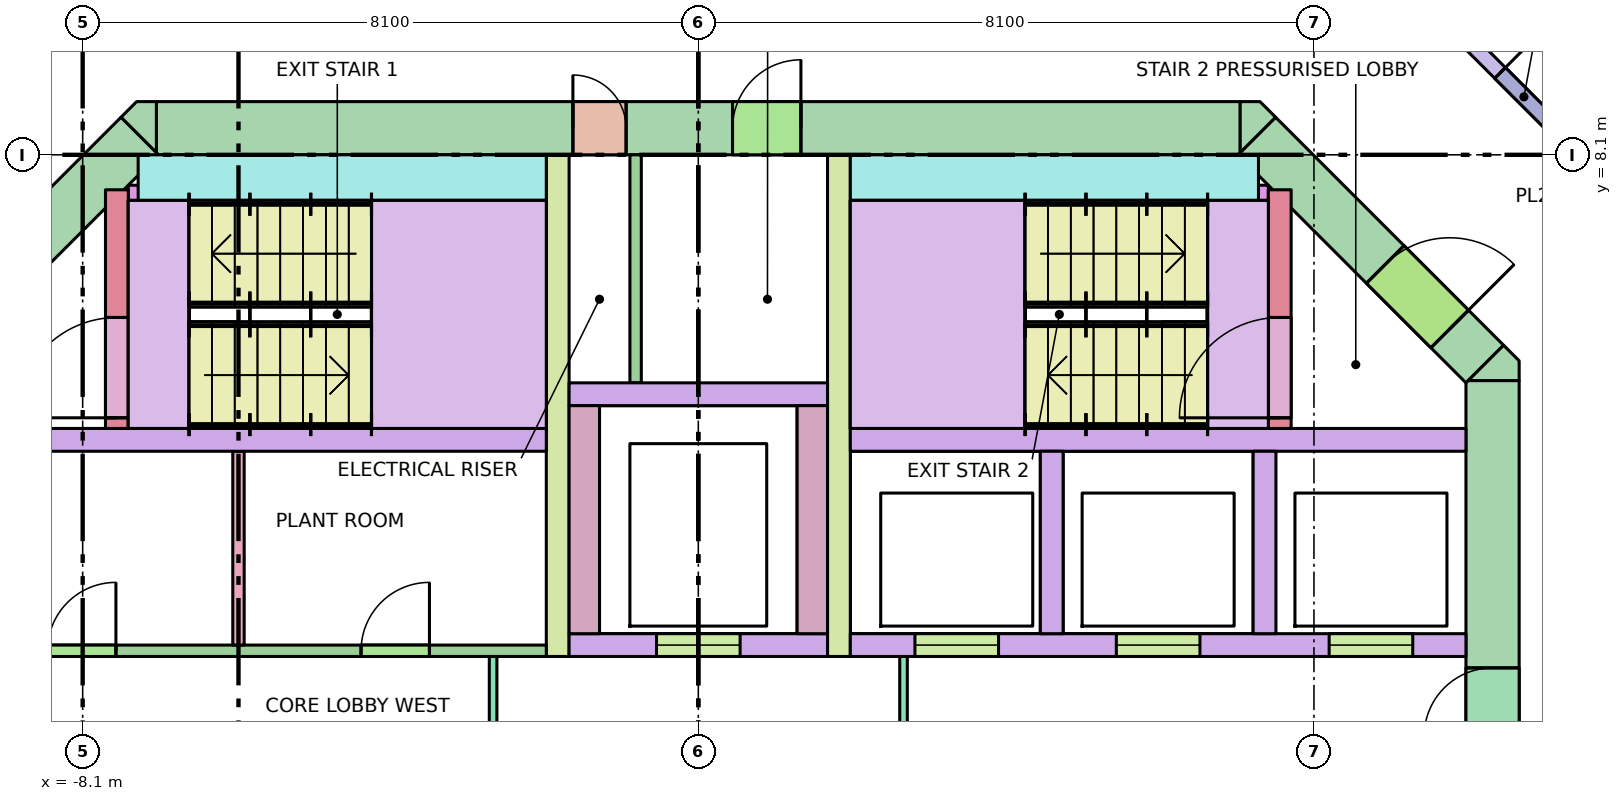
"""IFC4 building model, lengths in metres.
Left out: names, types, materials, properties, quantities, classifications, styles, units other than length and angle.
Written with IfcOpenShell. Run it as: python <this file> out.ifc"""

import sys

from ifc_helpers import new_model, si_unit, direction, frame, frame_2d, origin, place, context, subcontext, project, spatial, polyline, rectangle, outline, extrude, element, fill, save


model = new_model("IFC4")
c1 = context("Model", 3, precision=1e-05, world=origin(), true_north=direction((0.0, 1.0)))
c2 = subcontext(c1, "Body", "Model", "MODEL_VIEW")
j1 = project(units=[si_unit("LENGTHUNIT", "METRE"), si_unit("PLANEANGLEUNIT", "RADIAN")], contexts=[c1])
p1 = place(None, origin())
s1 = spatial("IfcSite", under=j1, at=p1, CompositionType="ELEMENT")
p2 = place(p1, origin())
s2 = spatial("IfcBuilding", under=s1, at=p2, CompositionType="ELEMENT")
p3 = place(p2, frame((0.0, 0.0, 183.8)))
s3 = spatial("IfcBuildingStorey", under=s2, at=p3, CompositionType="ELEMENT", Elevation=183.8)
p4 = place(p3, frame((-7.13, 8.45, -0.28), z_axis=(0.0, 0.0, 1.0), x_axis=(1.0, 0.0, 0.0)))
e1 = element("IfcWall", 1, at=p4, inside=s3, PredefinedType="SHEAR", context=c2, shape_type="SweptSolid", body=[
    extrude(rectangle(XDim=14.26, YDim=0.7, at=frame_2d((7.13, 0.0))), origin(), (0.0, 0.0, 1.0), 9.0),
])
p5 = place(p4, frame((5.48, 0.0, 0.28)))
e2 = element("IfcOpeningElement", 2, at=p5, cuts=e1, PredefinedType="OPENING", context=c2, shape_type="SweptSolid", body=[
    extrude(rectangle(XDim=0.7, YDim=2.1, at=frame_2d((0.35, 1.05))), frame((0.0, 0.36, 0.0), z_axis=(0.0, -1.0, 0.0), x_axis=(1.0, 0.0, 0.0)), (0.0, 0.0, 1.0), 0.72),
])
p6 = place(p4, frame((7.58, 0.0, 0.28)))
e3 = element("IfcOpeningElement", 3, at=p6, cuts=e1, PredefinedType="OPENING", context=c2, shape_type="SweptSolid", body=[
    extrude(rectangle(XDim=0.9, YDim=2.1, at=frame_2d((0.45, 1.05))), frame((0.0, 0.36, 0.0), z_axis=(0.0, -1.0, 0.0), x_axis=(1.0, 0.0, 0.0)), (0.0, 0.0, 1.0), 0.72),
])
p7 = place(p3, frame((10.45, -5.13, -0.28), z_axis=(0.0, 0.0, 1.0), x_axis=(0.0, 1.0, 0.0)))
e4 = element("IfcWall", 4, at=p7, inside=s3, PredefinedType="SHEAR", context=c2, shape_type="SweptSolid", body=[
    extrude(rectangle(XDim=10.26, YDim=0.7, at=frame_2d((5.13, 0.0))), origin(), (0.0, 0.0, 1.0), 9.0),
])
p8 = place(p7, frame((5.58, 0.0, 0.28)))
e5 = element("IfcOpeningElement", 5, at=p8, cuts=e4, PredefinedType="OPENING", context=c2, shape_type="SweptSolid", body=[
    extrude(rectangle(XDim=0.9, YDim=2.1, at=frame_2d((0.45, 1.05))), frame((0.0, 0.36, 0.0), z_axis=(0.0, -1.0, 0.0), x_axis=(1.0, 0.0, 0.0)), (0.0, 0.0, 1.0), 0.72),
])
p9 = place(p7, frame((3.78, 0.0, 0.28)))
e6 = element("IfcOpeningElement", 6, at=p9, cuts=e4, PredefinedType="OPENING", context=c2, shape_type="SweptSolid", body=[
    extrude(rectangle(XDim=0.9, YDim=2.1, at=frame_2d((0.45, 1.05))), frame((0.0, 0.36, 0.0), z_axis=(0.0, -1.0, 0.0), x_axis=(1.0, 0.0, 0.0)), (0.0, 0.0, 1.0), 0.72),
])
p10 = place(p3, frame((-10.347, 5.347, -0.28), z_axis=(0.0, 0.0, 1.0), x_axis=(0.707106781187, 0.707106781187, 0.0)))
e7 = element("IfcWall", 7, at=p10, inside=s3, PredefinedType="SHEAR", context=c2, shape_type="SweptSolid", body=[
    extrude(rectangle(XDim=4.243, YDim=0.7, at=frame_2d((2.121, 0.0))), origin(), (0.0, 0.0, 1.0), 9.0),
])
p11 = place(p10, frame((0.65, 0.0, 0.28)))
e8 = element("IfcOpeningElement", 8, at=p11, cuts=e7, PredefinedType="OPENING", context=c2, shape_type="SweptSolid", body=[
    extrude(rectangle(XDim=1.2, YDim=2.1, at=frame_2d((0.6, 1.05))), frame((0.0, 0.36, 0.0), z_axis=(0.0, -1.0, 0.0), x_axis=(1.0, 0.0, 0.0)), (0.0, 0.0, 1.0), 0.72),
])
p12 = place(p3, frame((7.347, 8.347, -0.28), z_axis=(0.0, 0.0, 1.0), x_axis=(0.707106781187, -0.707106781187, 0.0)))
e9 = element("IfcWall", 9, at=p12, inside=s3, PredefinedType="SHEAR", context=c2, shape_type="SweptSolid", body=[
    extrude(rectangle(XDim=4.243, YDim=0.7, at=frame_2d((2.121, 0.0))), origin(), (0.0, 0.0, 1.0), 9.0),
])
p13 = place(p12, frame((2.39, 0.0, 0.28)))
e10 = element("IfcOpeningElement", 10, at=p13, cuts=e9, PredefinedType="OPENING", context=c2, shape_type="SweptSolid", body=[
    extrude(rectangle(XDim=1.2, YDim=2.1, at=frame_2d((0.6, 1.05))), frame((0.0, 0.36, 0.0), z_axis=(0.0, -1.0, 0.0), x_axis=(1.0, 0.0, 0.0)), (0.0, 0.0, 1.0), 0.72),
])
p14 = place(p3, frame((0.0, 0.0, -0.28)))
e11 = element("IfcWall", 11, at=p14, inside=s3, PredefinedType="SHEAR", context=c2, shape_type="SweptSolid", body=[
    extrude(outline(polyline([(10.8, 5.39), (10.8, 5.13), (10.8, 5.13), (10.13, 5.13), (10.595, 5.595), (10.595, 5.595), (10.595, 5.595), (10.8, 5.39)])), origin(), (0.0, 0.0, 1.0), 9.0),
])
p15 = place(p3, frame((0.0, 0.0, -0.28)))
e12 = element("IfcWall", 12, at=p15, inside=s3, PredefinedType="SHEAR", context=c2, shape_type="SweptSolid", body=[
    extrude(outline(polyline([(-7.39, 8.8), (-7.13, 8.8), (-7.13, 8.8), (-7.13, 8.13), (-7.595, 8.595), (-7.595, 8.595), (-7.595, 8.595), (-7.39, 8.8)])), origin(), (0.0, 0.0, 1.0), 9.0),
])
p16 = place(p3, frame((0.0, 0.0, -0.28)))
e13 = element("IfcWall", 13, at=p16, inside=s3, PredefinedType="SHEAR", context=c2, shape_type="SweptSolid", body=[
    extrude(outline(polyline([(7.39, 8.8), (7.595, 8.595), (7.595, 8.595), (7.595, 8.595), (7.13, 8.13), (7.13, 8.8), (7.13, 8.8), (7.39, 8.8)])), origin(), (0.0, 0.0, 1.0), 9.0),
])
for number, where, z_axis, x_axis in (
    (14, (-10.1, 4.35, 0.0), (0.0, 0.0, 1.0), (1.0, 0.0, 0.0)),
    (15, (2.0, 4.35, 0.0), (0.0, 0.0, 1.0), (1.0, 0.0, 0.0)),
):
    element("IfcWall", number, at=place(p3, frame(where, z_axis=z_axis, x_axis=x_axis)), inside=s3, PredefinedType="SOLIDWALL", context=c2, shape_type="SweptSolid", body=[
        extrude(rectangle(XDim=8.1, YDim=0.3, at=frame_2d((4.05, 0.0))), origin(), (0.0, 0.0, 1.0), 8.72),
    ])
p17 = place(p3, frame((2.0, 1.65, 0.0), z_axis=(0.0, 0.0, 1.0), x_axis=(1.0, 0.0, 0.0)))
e16 = element("IfcWall", 16, at=p17, inside=s3, PredefinedType="SOLIDWALL", context=c2, shape_type="SweptSolid", body=[
    extrude(rectangle(XDim=8.1, YDim=0.3, at=frame_2d((4.05, 0.0))), origin(), (0.0, 0.0, 1.0), 8.72),
])
p18 = place(p17, frame((0.85, 0.0, 0.0)))
e17 = element("IfcOpeningElement", 17, at=p18, cuts=e16, PredefinedType="OPENING", context=c2, shape_type="SweptSolid", body=[
    extrude(rectangle(XDim=1.1, YDim=2.1, at=frame_2d((0.55, 1.05))), frame((0.0, 0.16, 0.0), z_axis=(0.0, -1.0, 0.0), x_axis=(1.0, 0.0, 0.0)), (0.0, 0.0, 1.0), 0.32),
])
p19 = place(p17, frame((3.5, 0.0, 0.0)))
e18 = element("IfcOpeningElement", 18, at=p19, cuts=e16, PredefinedType="OPENING", context=c2, shape_type="SweptSolid", body=[
    extrude(rectangle(XDim=1.1, YDim=2.1, at=frame_2d((0.55, 1.05))), frame((0.0, 0.16, 0.0), z_axis=(0.0, -1.0, 0.0), x_axis=(1.0, 0.0, 0.0)), (0.0, 0.0, 1.0), 0.32),
])
p20 = place(p17, frame((6.3, 0.0, 0.0)))
e19 = element("IfcOpeningElement", 19, at=p20, cuts=e16, PredefinedType="OPENING", context=c2, shape_type="SweptSolid", body=[
    extrude(rectangle(XDim=1.1, YDim=2.1, at=frame_2d((0.55, 1.05))), frame((0.0, 0.16, 0.0), z_axis=(0.0, -1.0, 0.0), x_axis=(1.0, 0.0, 0.0)), (0.0, 0.0, 1.0), 0.32),
])
for number, where, z_axis, x_axis in (
    (20, (4.65, 1.8, 0.0), (0.0, 0.0, 1.0), (0.0, 1.0, 0.0)),
    (21, (7.45, 1.8, 0.0), (0.0, 0.0, 1.0), (0.0, 1.0, 0.0)),
):
    element("IfcWall", number, at=place(p3, frame(where, z_axis=z_axis, x_axis=x_axis)), inside=s3, PredefinedType="SOLIDWALL", context=c2, shape_type="SweptSolid", body=[
        extrude(rectangle(XDim=2.4, YDim=0.3, at=frame_2d((1.2, 0.0))), origin(), (0.0, 0.0, 1.0), 8.72),
    ])
for number, where, z_axis, x_axis in (
    (22, (-1.85, 1.5, 0.0), (0.0, 0.0, 1.0), (0.0, 1.0, 0.0)),
    (23, (1.85, 1.5, 0.0), (0.0, 0.0, 1.0), (0.0, 1.0, 0.0)),
):
    element("IfcWall", number, at=place(p3, frame(where, z_axis=z_axis, x_axis=x_axis)), inside=s3, PredefinedType="SHEAR", context=c2, shape_type="SweptSolid", body=[
        extrude(rectangle(XDim=6.6, YDim=0.3, at=frame_2d((3.3, 0.0))), origin(), (0.0, 0.0, 1.0), 8.72),
    ])
p21 = place(p3, frame((-1.7, 1.65, 0.0), z_axis=(0.0, 0.0, 1.0), x_axis=(1.0, 0.0, 0.0)))
e24 = element("IfcWall", 24, at=p21, inside=s3, PredefinedType="SOLIDWALL", context=c2, shape_type="SweptSolid", body=[
    extrude(rectangle(XDim=3.4, YDim=0.3, at=frame_2d((1.7, 0.0))), origin(), (0.0, 0.0, 1.0), 8.72),
])
p22 = place(p21, frame((1.15, 0.0, 0.0)))
e25 = element("IfcOpeningElement", 25, at=p22, cuts=e24, PredefinedType="OPENING", context=c2, shape_type="SweptSolid", body=[
    extrude(rectangle(XDim=1.1, YDim=2.1, at=frame_2d((0.55, 1.05))), frame((0.0, 0.16, 0.0), z_axis=(0.0, -1.0, 0.0), x_axis=(1.0, 0.0, 0.0)), (0.0, 0.0, 1.0), 0.32),
])
for number, where, z_axis, x_axis in (
    (26, (-1.5, 1.8, 0.0), (0.0, 0.0, 1.0), (0.0, 1.0, 0.0)),
    (27, (1.5, 1.8, 0.0), (0.0, 0.0, 1.0), (0.0, 1.0, 0.0)),
):
    element("IfcWall", number, at=place(p3, frame(where, z_axis=z_axis, x_axis=x_axis)), inside=s3, PredefinedType="SOLIDWALL", context=c2, shape_type="SweptSolid", body=[
        extrude(rectangle(XDim=3.0, YDim=0.4, at=frame_2d((1.5, 0.0))), origin(), (0.0, 0.0, 1.0), 8.72),
    ])
p23 = place(p3, frame((-1.7, 4.95, 0.0), z_axis=(0.0, 0.0, 1.0), x_axis=(1.0, 0.0, 0.0)))
e28 = element("IfcWall", 28, at=p23, inside=s3, PredefinedType="SOLIDWALL", context=c2, shape_type="SweptSolid", body=[
    extrude(rectangle(XDim=3.4, YDim=0.3, at=frame_2d((1.7, 0.0))), origin(), (0.0, 0.0, 1.0), 8.72),
])
p24 = place(p3, frame((-7.65, 4.5, 0.0), z_axis=(0.0, 0.0, 1.0), x_axis=(0.0, 1.0, 0.0)))
e29 = element("IfcWall", 29, at=p24, inside=s3, PredefinedType="SHEAR", context=c2, shape_type="SweptSolid", body=[
    extrude(rectangle(XDim=3.14, YDim=0.3, at=frame_2d((1.57, 0.0))), origin(), (0.0, 0.0, 1.0), 8.72),
])
p25 = place(p24, frame((0.14, 0.0, 0.0)))
e30 = element("IfcOpeningElement", 30, at=p25, cuts=e29, PredefinedType="OPENING", context=c2, shape_type="SweptSolid", body=[
    extrude(rectangle(XDim=1.32, YDim=2.1, at=frame_2d((0.66, 1.05))), frame((0.0, 0.16, 0.0), z_axis=(0.0, -1.0, 0.0), x_axis=(1.0, 0.0, 0.0)), (0.0, 0.0, 1.0), 0.32),
])
p26 = place(p3, frame((-7.37, 7.8, 0.0), z_axis=(0.0, 0.0, 1.0), x_axis=(1.0, 0.0, 0.0)))
e31 = element("IfcWall", 31, at=p26, inside=s3, PredefinedType="SHEAR", context=c2, shape_type="SweptSolid", body=[
    extrude(rectangle(XDim=5.37, YDim=0.6, at=frame_2d((2.685, 0.0))), origin(), (0.0, 0.0, 1.0), 8.72),
])
p27 = place(p3, frame((7.65, 4.5, 0.0), z_axis=(0.0, 0.0, 1.0), x_axis=(0.0, 1.0, 0.0)))
e32 = element("IfcWall", 32, at=p27, inside=s3, PredefinedType="SHEAR", context=c2, shape_type="SweptSolid", body=[
    extrude(rectangle(XDim=3.14, YDim=0.3, at=frame_2d((1.57, 0.0))), origin(), (0.0, 0.0, 1.0), 8.72),
])
p28 = place(p27, frame((0.14, 0.0, 0.0)))
e33 = element("IfcOpeningElement", 33, at=p28, cuts=e32, PredefinedType="OPENING", context=c2, shape_type="SweptSolid", body=[
    extrude(rectangle(XDim=1.32, YDim=2.1, at=frame_2d((0.66, 1.05))), frame((0.0, 0.16, 0.0), z_axis=(0.0, -1.0, 0.0), x_axis=(1.0, 0.0, 0.0)), (0.0, 0.0, 1.0), 0.32),
])
p29 = place(p3, frame((2.0, 7.8, 0.0), z_axis=(0.0, 0.0, 1.0), x_axis=(1.0, 0.0, 0.0)))
e34 = element("IfcWall", 34, at=p29, inside=s3, PredefinedType="SHEAR", context=c2, shape_type="SweptSolid", body=[
    extrude(rectangle(XDim=5.37, YDim=0.6, at=frame_2d((2.685, 0.0))), origin(), (0.0, 0.0, 1.0), 8.72),
])
for number, where, z_axis, x_axis in (
    (35, (-7.5, 7.6, 0.0), (0.0, 0.0, 1.0), (1.0, 0.0, 0.0)),
    (36, (6.9, 7.6, 0.0), (0.0, 0.0, 1.0), (1.0, 0.0, 0.0)),
):
    element("IfcWall", number, at=place(p3, frame(where, z_axis=z_axis, x_axis=x_axis)), inside=s3, PredefinedType="SHEAR", context=c2, shape_type="SweptSolid", body=[
        extrude(rectangle(XDim=0.6, YDim=0.2, at=frame_2d((0.3, 0.0))), origin(), (0.0, 0.0, 1.0), 8.72),
    ])
p30 = place(p3, frame((-2.7, -1.5, 0.0), z_axis=(0.0, 0.0, 1.0), x_axis=(0.0, 1.0, 0.0)))
e37 = element("IfcWall", 37, at=p30, inside=s3, PredefinedType="PARTITIONING", context=c2, shape_type="SweptSolid", body=[
    extrude(rectangle(XDim=3.0, YDim=0.1, at=frame_2d((1.5, 0.0))), origin(), (0.0, 0.0, 1.0), 8.72),
])
p31 = place(p30, frame((0.9, 0.0, 0.0)))
e38 = element("IfcOpeningElement", 38, at=p31, cuts=e37, PredefinedType="OPENING", context=c2, shape_type="SweptSolid", body=[
    extrude(rectangle(XDim=1.2, YDim=2.1, at=frame_2d((0.6, 1.05))), frame((0.0, 0.06, 0.0), z_axis=(0.0, -1.0, 0.0), x_axis=(1.0, 0.0, 0.0)), (0.0, 0.0, 1.0), 0.12),
])
p32 = place(p3, frame((2.7, -1.5, 0.0), z_axis=(0.0, 0.0, 1.0), x_axis=(0.0, 1.0, 0.0)))
e39 = element("IfcWall", 39, at=p32, inside=s3, PredefinedType="PARTITIONING", context=c2, shape_type="SweptSolid", body=[
    extrude(rectangle(XDim=3.0, YDim=0.1, at=frame_2d((1.5, 0.0))), origin(), (0.0, 0.0, 1.0), 8.72),
])
p33 = place(p32, frame((0.9, 0.0, 0.0)))
e40 = element("IfcOpeningElement", 40, at=p33, cuts=e39, PredefinedType="OPENING", context=c2, shape_type="SweptSolid", body=[
    extrude(rectangle(XDim=1.2, YDim=2.1, at=frame_2d((0.6, 1.05))), frame((0.0, 0.06, 0.0), z_axis=(0.0, -1.0, 0.0), x_axis=(1.0, 0.0, 0.0)), (0.0, 0.0, 1.0), 0.12),
])
p34 = place(p3, frame((-0.825, 5.1, 0.0), z_axis=(0.0, 0.0, 1.0), x_axis=(0.0, 1.0, 0.0)))
e41 = element("IfcWall", 41, at=p34, inside=s3, PredefinedType="PARTITIONING", context=c2, shape_type="SweptSolid", body=[
    extrude(rectangle(XDim=3.0, YDim=0.15, at=frame_2d((1.5, 0.0))), origin(), (0.0, 0.0, 1.0), 8.72),
])
p35 = place(p3, frame((-6.05, 1.65, 0.0), z_axis=(0.0, 0.0, 1.0), x_axis=(0.0, 1.0, 0.0)))
e42 = element("IfcWall", 42, at=p35, inside=s3, PredefinedType="PARTITIONING", context=c2, shape_type="SweptSolid", body=[
    extrude(rectangle(XDim=2.55, YDim=0.15, at=frame_2d((1.275, 0.0))), origin(), (0.0, 0.0, 1.0), 8.72),
])
p36 = place(p3, frame((-10.1, 1.575, 0.0), z_axis=(0.0, 0.0, 1.0), x_axis=(1.0, 0.0, 0.0)))
e43 = element("IfcWall", 43, at=p36, inside=s3, PredefinedType="PARTITIONING", context=c2, shape_type="SweptSolid", body=[
    extrude(rectangle(XDim=8.1, YDim=0.15, at=frame_2d((4.05, 0.0))), origin(), (0.0, 0.0, 1.0), 8.72),
])
p37 = place(p36, frame((1.538, 0.0, 0.0)))
e44 = element("IfcOpeningElement", 44, at=p37, cuts=e43, PredefinedType="OPENING", context=c2, shape_type="SweptSolid", body=[
    extrude(rectangle(XDim=0.9, YDim=2.1, at=frame_2d((0.45, 1.05))), frame((0.0, 0.085, 0.0), z_axis=(0.0, -1.0, 0.0), x_axis=(1.0, 0.0, 0.0)), (0.0, 0.0, 1.0), 0.17),
])
p38 = place(p36, frame((5.663, 0.0, 0.0)))
e45 = element("IfcOpeningElement", 45, at=p38, cuts=e43, PredefinedType="OPENING", context=c2, shape_type="SweptSolid", body=[
    extrude(rectangle(XDim=0.9, YDim=2.1, at=frame_2d((0.45, 1.05))), frame((0.0, 0.085, 0.0), z_axis=(0.0, -1.0, 0.0), x_axis=(1.0, 0.0, 0.0)), (0.0, 0.0, 1.0), 0.17),
])
p39 = place(p3, frame((-13.25, 6.475, 0.0), z_axis=(0.0, 0.0, 1.0), x_axis=(0.707106781187, 0.707106781187, 0.0)))
e46 = element("IfcWall", 46, at=p39, inside=s3, PredefinedType="PARTITIONING", context=c2, shape_type="SweptSolid", body=[
    extrude(rectangle(XDim=6.753, YDim=0.2, at=frame_2d((3.377, 0.0))), origin(), (0.0, 0.0, 1.0), 7.92),
])
p40 = place(p39, frame((5.447, 0.0, 0.0)))
e47 = element("IfcOpeningElement", 47, at=p40, cuts=e46, PredefinedType="OPENING", context=c2, shape_type="SweptSolid", body=[
    extrude(rectangle(XDim=0.9, YDim=2.1, at=frame_2d((0.45, 1.05))), frame((0.0, 0.11, 0.0), z_axis=(0.0, -1.0, 0.0), x_axis=(1.0, 0.0, 0.0)), (0.0, 0.0, 1.0), 0.22),
])
p41 = place(p39, frame((2.021, 0.0, 0.0)))
e48 = element("IfcOpeningElement", 48, at=p41, cuts=e46, PredefinedType="OPENING", context=c2, shape_type="SweptSolid", body=[
    extrude(rectangle(XDim=1.8, YDim=2.1, at=frame_2d((0.9, 1.05))), frame((0.0, 0.11, 0.0), z_axis=(0.0, -1.0, 0.0), x_axis=(1.0, 0.0, 0.0)), (0.0, 0.0, 1.0), 0.22),
])
p42 = place(p3, frame((8.475, 11.25, 0.0), z_axis=(0.0, 0.0, 1.0), x_axis=(0.707106781187, -0.707106781187, 0.0)))
e49 = element("IfcWall", 49, at=p42, inside=s3, PredefinedType="PARTITIONING", context=c2, shape_type="SweptSolid", body=[
    extrude(rectangle(XDim=6.753, YDim=0.2, at=frame_2d((3.377, 0.0))), origin(), (0.0, 0.0, 1.0), 7.92),
])
p43 = place(p42, frame((2.932, 0.0, 0.0)))
e50 = element("IfcOpeningElement", 50, at=p43, cuts=e49, PredefinedType="OPENING", context=c2, shape_type="SweptSolid", body=[
    extrude(rectangle(XDim=1.8, YDim=2.1, at=frame_2d((0.9, 1.05))), frame((0.0, 0.11, 0.0), z_axis=(0.0, -1.0, 0.0), x_axis=(1.0, 0.0, 0.0)), (0.0, 0.0, 1.0), 0.22),
])
p44 = place(p18, origin())
e51 = element("IfcDoor", 51, at=p44, inside=s3, OperationType="DOUBLE_DOOR_SLIDING", PredefinedType="DOOR", context=c2, shape_type="SweptSolid", body=[
    extrude(rectangle(XDim=1.1, YDim=2.1, at=frame_2d((0.55, 1.05))), frame((0.0, 0.025, 0.0), z_axis=(0.0, -1.0, 0.0), x_axis=(1.0, 0.0, 0.0)), (0.0, 0.0, 1.0), 0.05),
])
fill(e17, e51)
p45 = place(p19, origin())
e52 = element("IfcDoor", 52, at=p45, inside=s3, OperationType="DOUBLE_DOOR_SLIDING", PredefinedType="DOOR", context=c2, shape_type="SweptSolid", body=[
    extrude(rectangle(XDim=1.1, YDim=2.1, at=frame_2d((0.55, 1.05))), frame((0.0, 0.025, 0.0), z_axis=(0.0, -1.0, 0.0), x_axis=(1.0, 0.0, 0.0)), (0.0, 0.0, 1.0), 0.05),
])
fill(e18, e52)
p46 = place(p20, origin())
e53 = element("IfcDoor", 53, at=p46, inside=s3, OperationType="DOUBLE_DOOR_SLIDING", PredefinedType="DOOR", context=c2, shape_type="SweptSolid", body=[
    extrude(rectangle(XDim=1.1, YDim=2.1, at=frame_2d((0.55, 1.05))), frame((0.0, 0.025, 0.0), z_axis=(0.0, -1.0, 0.0), x_axis=(1.0, 0.0, 0.0)), (0.0, 0.0, 1.0), 0.05),
])
fill(e19, e53)
p47 = place(p22, origin())
e54 = element("IfcDoor", 54, at=p47, inside=s3, OperationType="DOUBLE_DOOR_SLIDING", PredefinedType="DOOR", context=c2, shape_type="SweptSolid", body=[
    extrude(rectangle(XDim=1.1, YDim=2.1, at=frame_2d((0.55, 1.05))), frame((0.0, 0.025, 0.0), z_axis=(0.0, -1.0, 0.0), x_axis=(1.0, 0.0, 0.0)), (0.0, 0.0, 1.0), 0.05),
])
fill(e25, e54)
p48 = place(p25, origin())
e55 = element("IfcDoor", 55, at=p48, inside=s3, OperationType="DOUBLE_DOOR_SINGLE_SWING", PredefinedType="DOOR", context=c2, shape_type="SweptSolid", body=[
    extrude(rectangle(XDim=1.32, YDim=2.1, at=frame_2d((0.66, 1.05))), frame((0.0, 0.025, 0.0), z_axis=(0.0, -1.0, 0.0), x_axis=(1.0, 0.0, 0.0)), (0.0, 0.0, 1.0), 0.05),
])
fill(e30, e55)
p49 = place(p28, origin())
e56 = element("IfcDoor", 56, at=p49, inside=s3, OperationType="DOUBLE_DOOR_SINGLE_SWING", PredefinedType="DOOR", context=c2, shape_type="SweptSolid", body=[
    extrude(rectangle(XDim=1.32, YDim=2.1, at=frame_2d((0.66, 1.05))), frame((0.0, 0.025, 0.0), z_axis=(0.0, -1.0, 0.0), x_axis=(1.0, 0.0, 0.0)), (0.0, 0.0, 1.0), 0.05),
])
fill(e33, e56)
p50 = place(p13, origin())
e57 = element("IfcDoor", 57, at=p50, inside=s3, OperationType="SINGLE_SWING_RIGHT", PredefinedType="DOOR", context=c2, shape_type="SweptSolid", body=[
    extrude(rectangle(XDim=1.2, YDim=2.1, at=frame_2d((0.6, 1.05))), frame((0.0, 0.025, 0.0), z_axis=(0.0, -1.0, 0.0), x_axis=(1.0, 0.0, 0.0)), (0.0, 0.0, 1.0), 0.05),
])
fill(e10, e57)
p51 = place(p8, origin())
e58 = element("IfcDoor", 58, at=p51, inside=s3, OperationType="SINGLE_SWING_LEFT", PredefinedType="DOOR", context=c2, shape_type="SweptSolid", body=[
    extrude(rectangle(XDim=0.9, YDim=2.1, at=frame_2d((0.45, 1.05))), frame((0.0, 0.025, 0.0), z_axis=(0.0, -1.0, 0.0), x_axis=(1.0, 0.0, 0.0)), (0.0, 0.0, 1.0), 0.05),
])
fill(e5, e58)
p52 = place(p5, origin())
e59 = element("IfcDoor", 59, at=p52, inside=s3, OperationType="SINGLE_SWING_LEFT", PredefinedType="DOOR", context=c2, shape_type="SweptSolid", body=[
    extrude(rectangle(XDim=0.7, YDim=2.1, at=frame_2d((0.35, 1.05))), frame((0.0, 0.025, 0.0), z_axis=(0.0, -1.0, 0.0), x_axis=(1.0, 0.0, 0.0)), (0.0, 0.0, 1.0), 0.05),
])
fill(e2, e59)
p53 = place(p6, origin())
e60 = element("IfcDoor", 60, at=p53, inside=s3, OperationType="SINGLE_SWING_RIGHT", PredefinedType="DOOR", context=c2, shape_type="SweptSolid", body=[
    extrude(rectangle(XDim=0.9, YDim=2.1, at=frame_2d((0.45, 1.05))), frame((0.0, 0.025, 0.0), z_axis=(0.0, -1.0, 0.0), x_axis=(1.0, 0.0, 0.0)), (0.0, 0.0, 1.0), 0.05),
])
fill(e3, e60)
p54 = place(p37, origin())
e61 = element("IfcDoor", 61, at=p54, inside=s3, OperationType="SINGLE_SWING_RIGHT", PredefinedType="DOOR", context=c2, shape_type="SweptSolid", body=[
    extrude(rectangle(XDim=0.9, YDim=2.1, at=frame_2d((0.45, 1.05))), frame((0.0, 0.025, 0.0), z_axis=(0.0, -1.0, 0.0), x_axis=(1.0, 0.0, 0.0)), (0.0, 0.0, 1.0), 0.05),
])
fill(e44, e61)
p55 = place(p38, origin())
e62 = element("IfcDoor", 62, at=p55, inside=s3, OperationType="SINGLE_SWING_RIGHT", PredefinedType="DOOR", context=c2, shape_type="SweptSolid", body=[
    extrude(rectangle(XDim=0.9, YDim=2.1, at=frame_2d((0.45, 1.05))), frame((0.0, 0.025, 0.0), z_axis=(0.0, -1.0, 0.0), x_axis=(1.0, 0.0, 0.0)), (0.0, 0.0, 1.0), 0.05),
])
fill(e45, e62)
p56 = place(p43, origin())
e63 = element("IfcDoor", 63, at=p56, inside=s3, OperationType="DOUBLE_DOOR_SINGLE_SWING", PredefinedType="DOOR", context=c2, shape_type="SweptSolid", body=[
    extrude(rectangle(XDim=1.8, YDim=2.1, at=frame_2d((0.9, 1.05))), frame((0.0, 0.025, 0.0), z_axis=(0.0, -1.0, 0.0), x_axis=(1.0, 0.0, 0.0)), (0.0, 0.0, 1.0), 0.05),
])
fill(e50, e63)
save(model, sys.argv[1])
